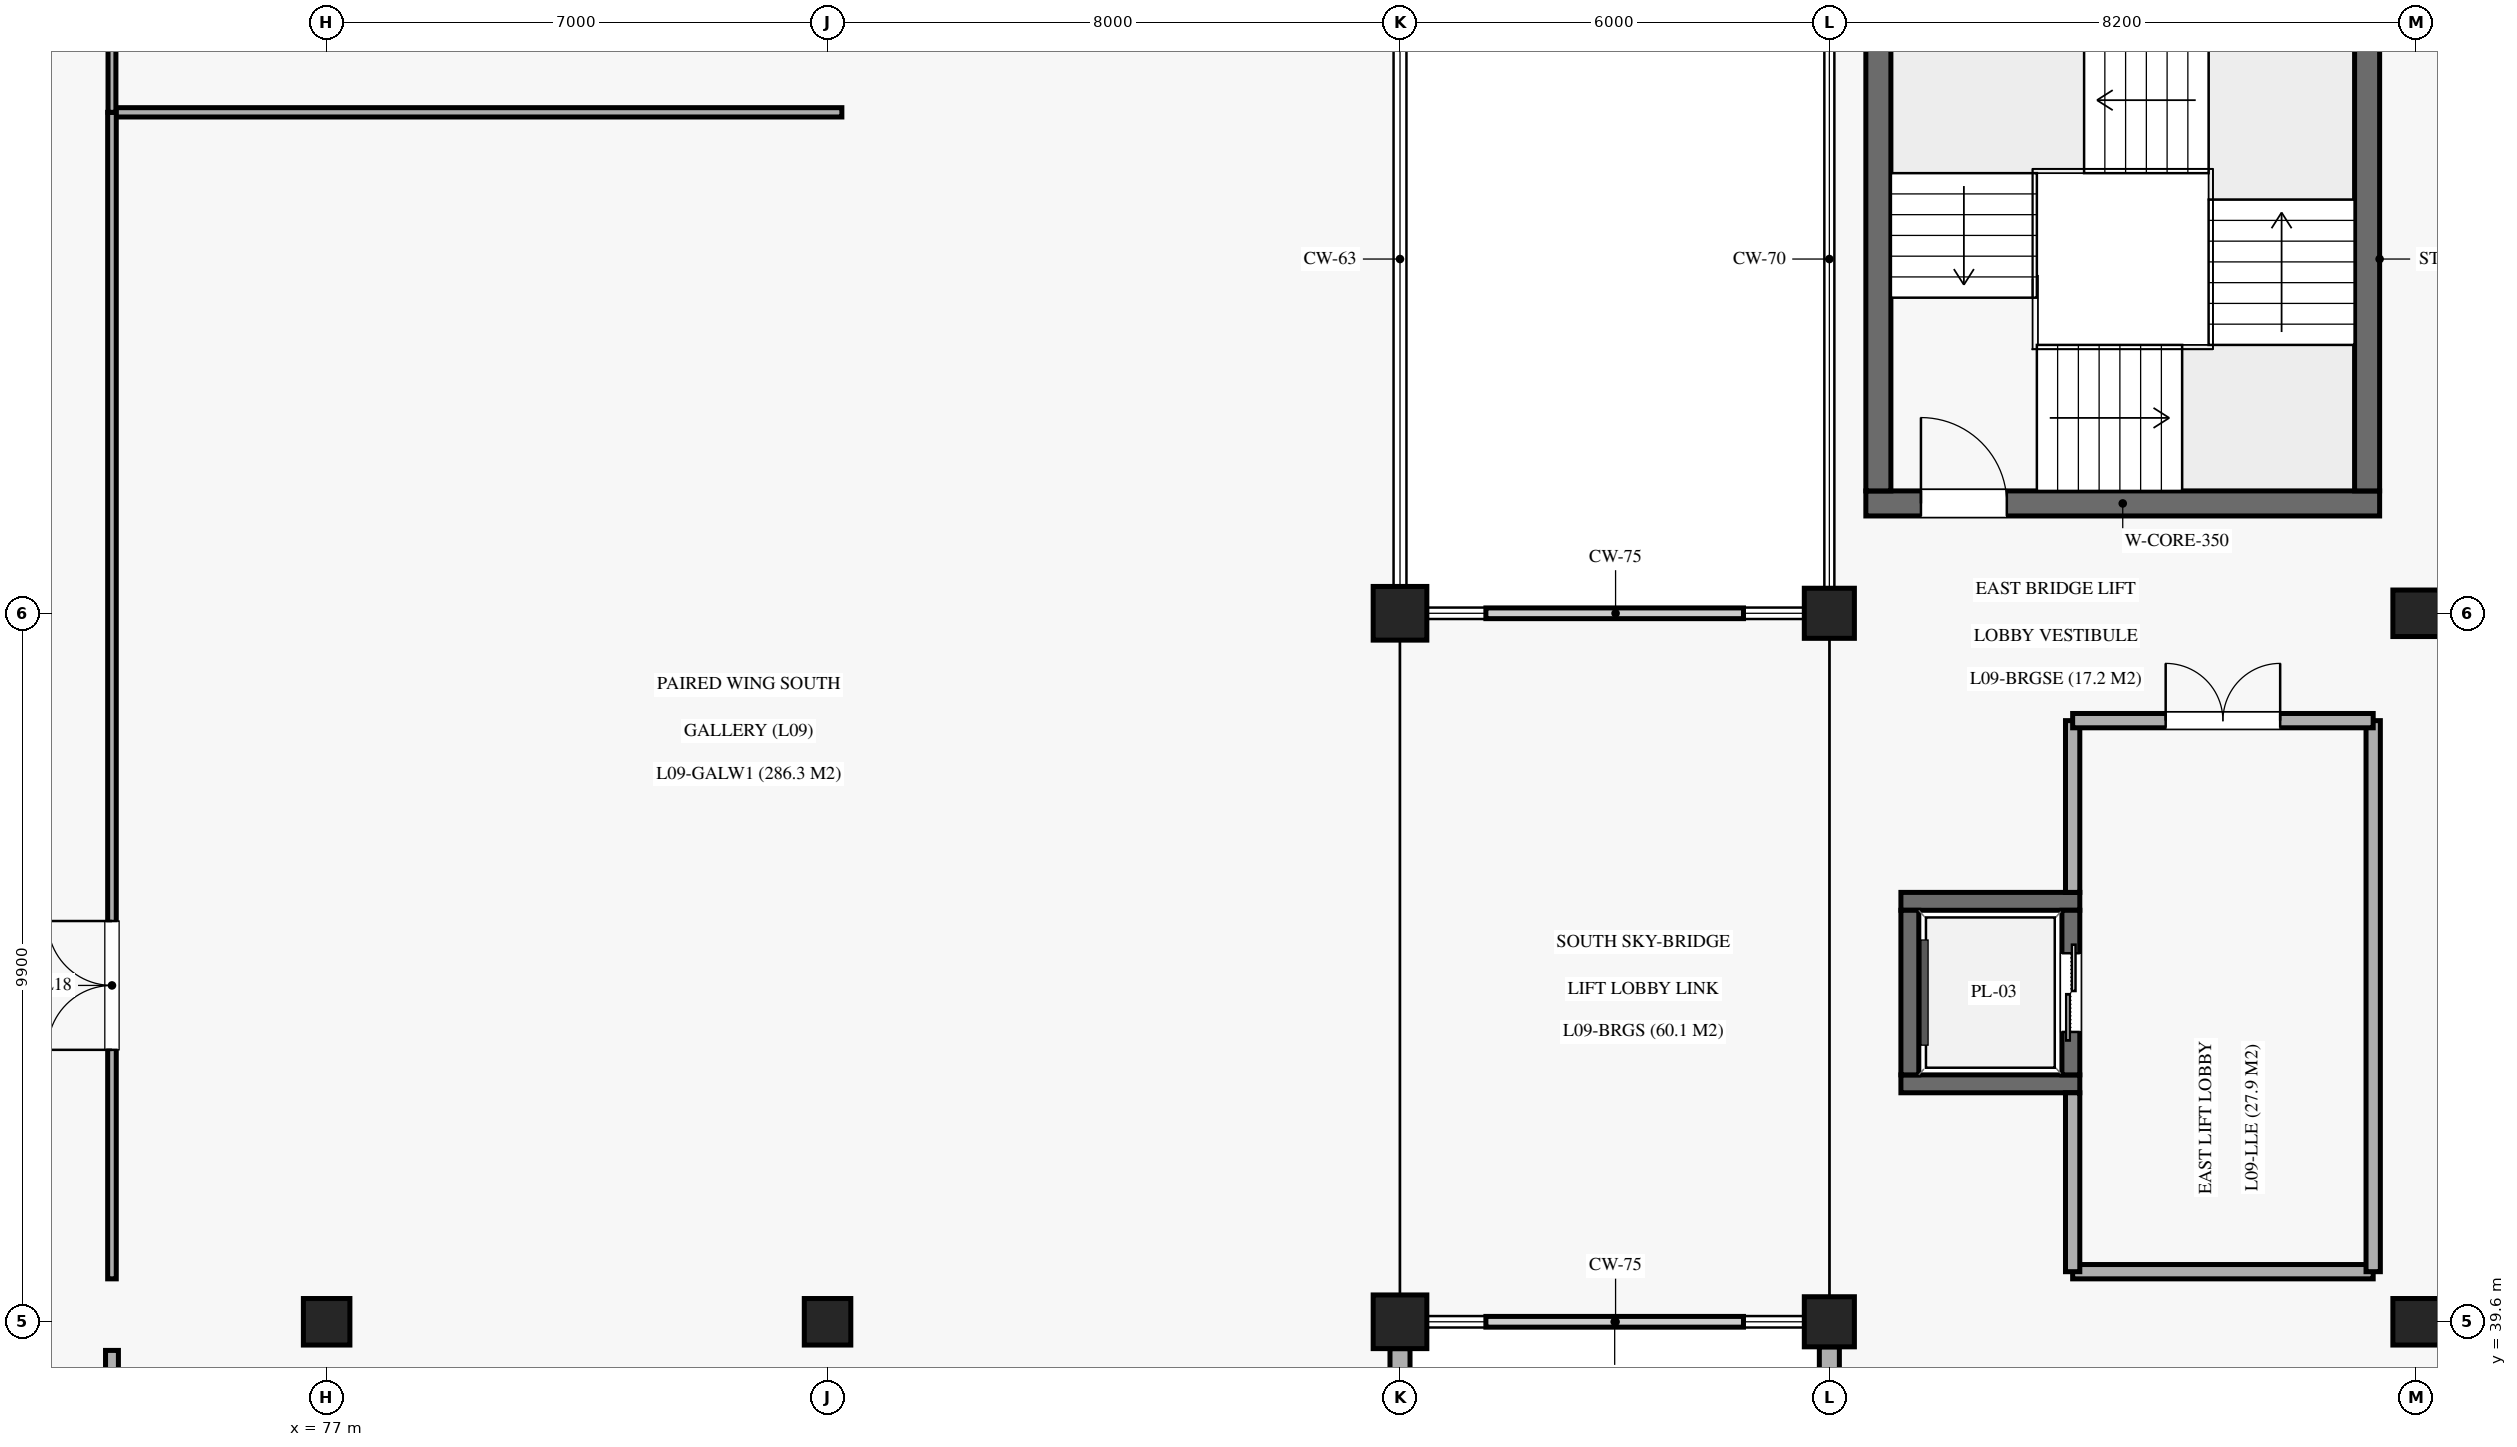
"""IFC4 building model, lengths in metres.
Left out: names, types, materials, properties, quantities, classifications, styles, units other than length and angle.
Written with IfcOpenShell. Run it as: python <this file> out.ifc"""

import sys

from ifc_helpers import new_model, si_unit, direction, frame, frame_2d, origin, origin_2d, place, context, subcontext, project, spatial, rectangle, extrude, element, fill, save


model = new_model("IFC4")
c1 = context("Model", 3, precision=1e-05, world=origin(), true_north=direction((0.0, 1.0)))
c2 = subcontext(c1, "Body", "Model", "MODEL_VIEW")
j1 = project(units=[si_unit("LENGTHUNIT", "METRE"), si_unit("PLANEANGLEUNIT", "RADIAN")], contexts=[c1])
p1 = place(None, origin())
s1 = spatial("IfcSite", under=j1, at=p1, CompositionType="ELEMENT")
p2 = place(p1, origin())
s2 = spatial("IfcBuilding", under=s1, at=p2, CompositionType="ELEMENT")
p3 = place(p2, frame((0.0, 0.0, 46.92)))
s3 = spatial("IfcBuildingStorey", under=s2, at=p3, CompositionType="ELEMENT", Elevation=46.92)
for number, where, z_axis, x_axis in (
    (1, (77.0, 39.6, 0.0), (0.0, 0.0, 1.0), (1.0, 0.0, 0.0)),
    (2, (84.0, 39.6, 0.0), (0.0, 0.0, 1.0), (1.0, 0.0, 0.0)),
):
    element("IfcColumn", number, at=place(p3, frame(where, z_axis=z_axis, x_axis=x_axis)), inside=s3, PredefinedType="COLUMN", context=c2, shape_type="SweptSolid", body=[
        extrude(rectangle(XDim=0.65, YDim=0.65, at=origin_2d()), origin(), (0.0, 0.0, 1.0), 5.1),
    ])
for number, where, z_axis, x_axis in (
    (3, (92.0, 39.6, 0.0), (0.0, 0.0, 1.0), (1.0, 0.0, 0.0)),
    (4, (92.0, 49.5, 0.0), (0.0, 0.0, 1.0), (1.0, 0.0, 0.0)),
):
    element("IfcColumn", number, at=place(p3, frame(where, z_axis=z_axis, x_axis=x_axis)), inside=s3, PredefinedType="COLUMN", context=c2, shape_type="SweptSolid", body=[
        extrude(rectangle(XDim=0.75, YDim=0.75, at=origin_2d()), origin(), (0.0, 0.0, 1.0), 5.1),
    ])
for number, where, z_axis, x_axis in (
    (5, (98.0, 39.6, 0.0), (0.0, 0.0, 1.0), (1.0, 0.0, 0.0)),
    (6, (98.0, 49.5, 0.0), (0.0, 0.0, 1.0), (1.0, 0.0, 0.0)),
):
    element("IfcColumn", number, at=place(p3, frame(where, z_axis=z_axis, x_axis=x_axis)), inside=s3, PredefinedType="COLUMN", context=c2, shape_type="SweptSolid", body=[
        extrude(rectangle(XDim=0.7, YDim=0.7, at=origin_2d()), origin(), (0.0, 0.0, 1.0), 5.1),
    ])
for number, where, z_axis, x_axis in (
    (7, (106.2, 39.6, 0.0), (0.0, 0.0, 1.0), (1.0, 0.0, 0.0)),
    (8, (106.2, 49.5, 0.0), (0.0, 0.0, 1.0), (1.0, 0.0, 0.0)),
):
    element("IfcColumn", number, at=place(p3, frame(where, z_axis=z_axis, x_axis=x_axis)), inside=s3, PredefinedType="COLUMN", context=c2, shape_type="SweptSolid", body=[
        extrude(rectangle(XDim=0.65, YDim=0.65, at=origin_2d()), origin(), (0.0, 0.0, 1.0), 5.1),
    ])
p4 = place(p3, frame((92.0, 30.075, 0.0), z_axis=(0.0, 0.0, 1.0), x_axis=(0.0, 1.0, 0.0)))
e9 = element("IfcWall", 9, at=p4, inside=s3, PredefinedType="SOLIDWALL", context=c2, shape_type="SweptSolid", body=[
    extrude(rectangle(XDim=9.15, YDim=0.28, at=frame_2d((4.575, 0.0))), origin(), (0.0, 0.0, 1.0), 4.1),
])
p5 = place(p3, frame((98.0, 30.05, 0.0), z_axis=(0.0, 0.0, 1.0), x_axis=(0.0, 1.0, 0.0)))
e10 = element("IfcWall", 10, at=p5, inside=s3, PredefinedType="SOLIDWALL", context=c2, shape_type="SweptSolid", body=[
    extrude(rectangle(XDim=9.2, YDim=0.28, at=frame_2d((4.6, 0.0))), origin(), (0.0, 0.0, 1.0), 4.1),
])
p6 = place(p5, frame((3.6, 0.0, 1.45)))
e11 = element("IfcOpeningElement", 11, at=p6, cuts=e10, PredefinedType="OPENING", context=c2, shape_type="SweptSolid", body=[
    extrude(rectangle(XDim=3.0, YDim=1.95, at=frame_2d((1.5, 0.975))), frame((0.0, 0.15, 0.0), z_axis=(0.0, -1.0, 0.0), x_axis=(1.0, 0.0, 0.0)), (0.0, 0.0, 1.0), 0.3),
])
p7 = place(p3, frame((98.51, 51.035, 0.0), z_axis=(0.0, 0.0, 1.0), x_axis=(1.0, 0.0, 0.0)))
e12 = element("IfcWall", 12, at=p7, inside=s3, PredefinedType="SHEAR", context=c2, shape_type="SweptSolid", body=[
    extrude(rectangle(XDim=7.18, YDim=0.35, at=frame_2d((3.59, 0.0))), origin(), (0.0, 0.0, 1.0), 4.85),
])
p8 = place(p7, frame((0.77, 0.0, 0.0)))
e13 = element("IfcOpeningElement", 13, at=p8, cuts=e12, PredefinedType="OPENING", context=c2, shape_type="SweptSolid", body=[
    extrude(rectangle(XDim=1.2, YDim=2.2, at=frame_2d((0.6, 1.1))), frame((0.0, 0.185, 0.0), z_axis=(0.0, -1.0, 0.0), x_axis=(1.0, 0.0, 0.0)), (0.0, 0.0, 1.0), 0.37),
])
for number, where, z_axis, x_axis in (
    (14, (98.685, 51.21, 0.0), (0.0, 0.0, 1.0), (0.0, 1.0, 0.0)),
    (15, (105.515, 51.21, 0.0), (0.0, 0.0, 1.0), (0.0, 1.0, 0.0)),
):
    element("IfcWall", number, at=place(p3, frame(where, z_axis=z_axis, x_axis=x_axis)), inside=s3, PredefinedType="SHEAR", context=c2, shape_type="SweptSolid", body=[
        extrude(rectangle(XDim=6.48, YDim=0.35, at=frame_2d((3.24, 0.0))), origin(), (0.0, 0.0, 1.0), 4.85),
    ])
for number, where, z_axis, x_axis in (
    (16, (99.0, 42.925, 0.0), (0.0, 0.0, 1.0), (1.0, 0.0, 0.0)),
    (17, (99.0, 45.475, 0.0), (0.0, 0.0, 1.0), (1.0, 0.0, 0.0)),
):
    element("IfcWall", number, at=place(p3, frame(where, z_axis=z_axis, x_axis=x_axis)), inside=s3, PredefinedType="SOLIDWALL", context=c2, shape_type="SweptSolid", body=[
        extrude(rectangle(XDim=2.5, YDim=0.25, at=frame_2d((1.25, 0.0))), origin(), (0.0, 0.0, 1.0), 4.83),
    ])
p9 = place(p3, frame((99.125, 43.05, 0.0), z_axis=(0.0, 0.0, 1.0), x_axis=(0.0, 1.0, 0.0)))
e18 = element("IfcWall", 18, at=p9, inside=s3, PredefinedType="SOLIDWALL", context=c2, shape_type="SweptSolid", body=[
    extrude(rectangle(XDim=2.3, YDim=0.25, at=frame_2d((1.15, 0.0))), origin(), (0.0, 0.0, 1.0), 4.83),
])
p10 = place(p3, frame((101.375, 43.05, 0.0), z_axis=(0.0, 0.0, 1.0), x_axis=(0.0, 1.0, 0.0)))
e19 = element("IfcWall", 19, at=p10, inside=s3, PredefinedType="SOLIDWALL", context=c2, shape_type="SweptSolid", body=[
    extrude(rectangle(XDim=2.3, YDim=0.25, at=frame_2d((1.15, 0.0))), origin(), (0.0, 0.0, 1.0), 4.83),
])
p11 = place(p10, frame((0.6, 0.0, 0.0)))
e20 = element("IfcOpeningElement", 20, at=p11, cuts=e19, PredefinedType="OPENING", context=c2, shape_type="SweptSolid", body=[
    extrude(rectangle(XDim=1.1, YDim=2.2, at=frame_2d((0.55, 1.1))), frame((0.0, 0.135, 0.0), z_axis=(0.0, -1.0, 0.0), x_axis=(1.0, 0.0, 0.0)), (0.0, 0.0, 1.0), 0.27),
])
p12 = place(p3, frame((101.4, 40.3, 0.0), z_axis=(0.0, 0.0, 1.0), x_axis=(1.0, 0.0, 0.0)))
e21 = element("IfcWall", 21, at=p12, inside=s3, PredefinedType="SOLIDWALL", context=c2, shape_type="SweptSolid", body=[
    extrude(rectangle(XDim=4.2, YDim=0.2, at=frame_2d((2.1, 0.0))), origin(), (0.0, 0.0, 1.0), 3.97),
])
p13 = place(p3, frame((101.4, 40.3, 0.0), z_axis=(0.0, 0.0, 1.0), x_axis=(0.0, 1.0, 0.0)))
e22 = element("IfcWall", 22, at=p13, inside=s3, PredefinedType="SOLIDWALL", context=c2, shape_type="SweptSolid", body=[
    extrude(rectangle(XDim=2.5, YDim=0.2, at=frame_2d((1.25, 0.0))), origin(), (0.0, 0.0, 1.0), 3.97),
])
p14 = place(p3, frame((101.4, 45.6, 0.0), z_axis=(0.0, 0.0, 1.0), x_axis=(0.0, 1.0, 0.0)))
e23 = element("IfcWall", 23, at=p14, inside=s3, PredefinedType="SOLIDWALL", context=c2, shape_type="SweptSolid", body=[
    extrude(rectangle(XDim=2.4, YDim=0.2, at=frame_2d((1.2, 0.0))), origin(), (0.0, 0.0, 1.0), 3.97),
])
p15 = place(p3, frame((105.6, 40.3, 0.0), z_axis=(0.0, 0.0, 1.0), x_axis=(0.0, 1.0, 0.0)))
e24 = element("IfcWall", 24, at=p15, inside=s3, PredefinedType="SOLIDWALL", context=c2, shape_type="SweptSolid", body=[
    extrude(rectangle(XDim=7.7, YDim=0.2, at=frame_2d((3.85, 0.0))), origin(), (0.0, 0.0, 1.0), 3.97),
])
p16 = place(p3, frame((101.4, 48.0, 0.0), z_axis=(0.0, 0.0, 1.0), x_axis=(1.0, 0.0, 0.0)))
e25 = element("IfcWall", 25, at=p16, inside=s3, PredefinedType="SOLIDWALL", context=c2, shape_type="SweptSolid", body=[
    extrude(rectangle(XDim=4.2, YDim=0.2, at=frame_2d((2.1, 0.0))), origin(), (0.0, 0.0, 1.0), 3.97),
])
p17 = place(p16, frame((1.3, 0.0, 0.0)))
e26 = element("IfcOpeningElement", 26, at=p17, cuts=e25, PredefinedType="OPENING", context=c2, shape_type="SweptSolid", body=[
    extrude(rectangle(XDim=1.6, YDim=2.2, at=frame_2d((0.8, 1.1))), frame((0.0, 0.11, 0.0), z_axis=(0.0, -1.0, 0.0), x_axis=(1.0, 0.0, 0.0)), (0.0, 0.0, 1.0), 0.22),
])
p18 = place(p3, frame((74.0, 56.5, 0.0), z_axis=(0.0, 0.0, 1.0), x_axis=(1.0, 0.0, 0.0)))
e27 = element("IfcWall", 27, at=p18, inside=s3, PredefinedType="PARTITIONING", context=c2, shape_type="SweptSolid", body=[
    extrude(rectangle(XDim=10.2, YDim=0.13, at=frame_2d((5.1, 0.0))), origin(), (0.0, 0.0, 1.0), 3.97),
])
p19 = place(p3, frame((74.0, 40.2, 0.0), z_axis=(0.0, 0.0, 1.0), x_axis=(0.0, 1.0, 0.0)))
e28 = element("IfcWall", 28, at=p19, inside=s3, PredefinedType="PARTITIONING", context=c2, shape_type="SweptSolid", body=[
    extrude(rectangle(XDim=16.3, YDim=0.12, at=frame_2d((8.15, 0.0))), origin(), (0.0, 0.0, 1.0), 3.97),
])
p20 = place(p19, frame((3.2, 0.0, 0.0)))
e29 = element("IfcOpeningElement", 29, at=p20, cuts=e28, PredefinedType="OPENING", context=c2, shape_type="SweptSolid", body=[
    extrude(rectangle(XDim=1.8, YDim=2.45, at=frame_2d((0.9, 1.225))), frame((0.0, 0.07, 0.0), z_axis=(0.0, -1.0, 0.0), x_axis=(1.0, 0.0, 0.0)), (0.0, 0.0, 1.0), 0.14),
])
p21 = place(p3, frame((74.0, 56.5, 0.0), z_axis=(0.0, 0.0, 1.0), x_axis=(0.0, 1.0, 0.0)))
e30 = element("IfcWall", 30, at=p21, inside=s3, PredefinedType="PARTITIONING", context=c2, shape_type="SweptSolid", body=[
    extrude(rectangle(XDim=12.3, YDim=0.11, at=frame_2d((6.15, 0.0))), origin(), (0.0, 0.0, 1.0), 3.97),
])
p22 = place(p21, frame((2.5, 0.0, 0.0)))
e31 = element("IfcOpeningElement", 31, at=p22, cuts=e30, PredefinedType="OPENING", context=c2, shape_type="SweptSolid", body=[
    extrude(rectangle(XDim=1.8, YDim=2.45, at=frame_2d((0.9, 1.225))), frame((0.0, 0.065, 0.0), z_axis=(0.0, -1.0, 0.0), x_axis=(1.0, 0.0, 0.0)), (0.0, 0.0, 1.0), 0.13),
])
p23 = place(p3, frame((74.0, 30.2, 0.0), z_axis=(0.0, 0.0, 1.0), x_axis=(0.0, 1.0, 0.0)))
e32 = element("IfcWall", 32, at=p23, inside=s3, PredefinedType="PARTITIONING", context=c2, shape_type="SweptSolid", body=[
    extrude(rectangle(XDim=9.0, YDim=0.18, at=frame_2d((4.5, 0.0))), origin(), (0.0, 0.0, 1.0), 3.97),
])
p24 = place(p23, frame((3.5, 0.0, 0.0)))
e33 = element("IfcOpeningElement", 33, at=p24, cuts=e32, PredefinedType="OPENING", context=c2, shape_type="SweptSolid", body=[
    extrude(rectangle(XDim=1.3, YDim=2.25, at=frame_2d((0.65, 1.125))), frame((0.0, 0.1, 0.0), z_axis=(0.0, -1.0, 0.0), x_axis=(1.0, 0.0, 0.0)), (0.0, 0.0, 1.0), 0.2),
])
p25 = place(p8, origin())
e34 = element("IfcDoor", 34, at=p25, inside=s3, OperationType="SINGLE_SWING_LEFT", PredefinedType="DOOR", context=c2, shape_type="SweptSolid", body=[
    extrude(rectangle(XDim=1.2, YDim=2.2, at=frame_2d((0.6, 1.1))), frame((0.0, 0.025, 0.0), z_axis=(0.0, -1.0, 0.0), x_axis=(1.0, 0.0, 0.0)), (0.0, 0.0, 1.0), 0.05),
])
fill(e13, e34)
p26 = place(p11, origin())
e35 = element("IfcDoor", 35, at=p26, inside=s3, OperationType="DOUBLE_DOOR_SLIDING", PredefinedType="DOOR", context=c2, shape_type="SweptSolid", body=[
    extrude(rectangle(XDim=1.1, YDim=2.2, at=frame_2d((0.55, 1.1))), frame((0.0, 0.025, 0.0), z_axis=(0.0, -1.0, 0.0), x_axis=(1.0, 0.0, 0.0)), (0.0, 0.0, 1.0), 0.05),
])
fill(e20, e35)
p27 = place(p17, origin())
e36 = element("IfcDoor", 36, at=p27, inside=s3, OperationType="DOUBLE_DOOR_SINGLE_SWING", PredefinedType="DOOR", context=c2, shape_type="SweptSolid", body=[
    extrude(rectangle(XDim=1.6, YDim=2.2, at=frame_2d((0.8, 1.1))), frame((0.0, 0.025, 0.0), z_axis=(0.0, -1.0, 0.0), x_axis=(1.0, 0.0, 0.0)), (0.0, 0.0, 1.0), 0.05),
])
fill(e26, e36)
p28 = place(p20, origin())
e37 = element("IfcDoor", 37, at=p28, inside=s3, OperationType="DOUBLE_DOOR_SINGLE_SWING", PredefinedType="DOOR", context=c2, shape_type="SweptSolid", body=[
    extrude(rectangle(XDim=1.8, YDim=2.45, at=frame_2d((0.9, 1.225))), frame((0.0, 0.025, 0.0), z_axis=(0.0, -1.0, 0.0), x_axis=(1.0, 0.0, 0.0)), (0.0, 0.0, 1.0), 0.05),
])
fill(e29, e37)
save(model, sys.argv[1])
